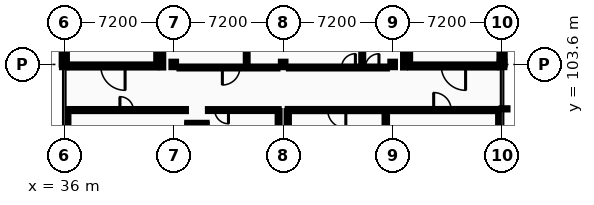
"""IFC4 building model, lengths in metres.
Left out: names, types, materials, properties, quantities, classifications, styles, units other than length and angle.
Written with IfcOpenShell. Run it as: python <this file> out.ifc"""

import sys

from ifc_helpers import new_model, si_unit, direction, frame, frame_2d, origin, origin_2d, place, context, subcontext, project, spatial, rectangle, i_section, extrude, element, fill, save


model = new_model("IFC4")
c1 = context("Model", 3, precision=1e-05, world=origin(), true_north=direction((0.0, 1.0)))
c2 = subcontext(c1, "Body", "Model", "MODEL_VIEW")
j1 = project(units=[si_unit("LENGTHUNIT", "METRE"), si_unit("PLANEANGLEUNIT", "RADIAN")], contexts=[c1])
p1 = place(None, origin())
s1 = spatial("IfcSite", under=j1, at=p1, CompositionType="ELEMENT")
p2 = place(p1, origin())
s2 = spatial("IfcBuilding", under=s1, at=p2, CompositionType="ELEMENT")
p3 = place(p2, frame((0.0, 0.0, 14.0)))
s3 = spatial("IfcBuildingStorey", under=s2, at=p3, CompositionType="ELEMENT", Elevation=14.0)
for number, where, z_axis, x_axis in (
    (1, (36.0, 103.6, 0.0), (0.0, 0.0, 1.0), (1.0, 0.0, 0.0)),
    (2, (43.2, 103.6, 0.0), (0.0, 0.0, 1.0), (1.0, 0.0, 0.0)),
    (3, (50.4, 103.6, 0.0), (0.0, 0.0, 1.0), (1.0, 0.0, 0.0)),
    (4, (57.6, 103.6, 0.0), (0.0, 0.0, 1.0), (1.0, 0.0, 0.0)),
    (5, (64.8, 103.6, 0.0), (0.0, 0.0, 1.0), (1.0, 0.0, 0.0)),
):
    element("IfcColumn", number, at=place(p3, frame(where, z_axis=z_axis, x_axis=x_axis)), inside=s3, PredefinedType="COLUMN", context=c2, shape_type="SweptSolid", body=[
        extrude(i_section(OverallWidth=0.3, OverallDepth=0.36, WebThickness=0.012, FlangeThickness=0.022, FilletRadius=0.027, at=origin_2d()), origin(), (0.0, 0.0, 1.0), 4.4),
    ])
p4 = place(p3, frame((36.0, 106.8, 0.0), z_axis=(0.0, 0.0, 1.0), x_axis=(0.0, -1.0, 0.0)))
e6 = element("IfcWall", 6, at=p4, inside=s3, PredefinedType="STANDARD", context=c2, shape_type="SweptSolid", body=[
    extrude(rectangle(XDim=3.2, YDim=0.34, at=frame_2d((1.6, 0.0))), origin(), (0.0, 0.0, 1.0), 4.2),
])
p5 = place(p4, frame((1.153, 0.0, 0.95)))
e7 = element("IfcOpeningElement", 7, at=p5, cuts=e6, PredefinedType="OPENING", context=c2, shape_type="SweptSolid", body=[
    extrude(rectangle(XDim=0.894, YDim=1.26, at=frame_2d((0.447, 0.63))), frame((0.0, 0.18, 0.0), z_axis=(0.0, -1.0, 0.0), x_axis=(1.0, 0.0, 0.0)), (0.0, 0.0, 1.0), 0.36),
])
p6 = place(p3, frame((64.8, 103.6, 0.0), z_axis=(0.0, 0.0, 1.0), x_axis=(0.0, 1.0, 0.0)))
e8 = element("IfcWall", 8, at=p6, inside=s3, PredefinedType="STANDARD", context=c2, shape_type="SweptSolid", body=[
    extrude(rectangle(XDim=3.2, YDim=0.34, at=frame_2d((1.6, 0.0))), origin(), (0.0, 0.0, 1.0), 4.2),
])
p7 = place(p6, frame((1.119, 0.0, 0.95)))
e9 = element("IfcOpeningElement", 9, at=p7, cuts=e8, PredefinedType="OPENING", context=c2, shape_type="SweptSolid", body=[
    extrude(rectangle(XDim=0.962, YDim=1.26, at=frame_2d((0.481, 0.63))), frame((0.0, 0.18, 0.0), z_axis=(0.0, -1.0, 0.0), x_axis=(1.0, 0.0, 0.0)), (0.0, 0.0, 1.0), 0.36),
])
p8 = place(p3, frame((36.35, 103.5, 0.0), z_axis=(0.0, 0.0, 1.0), x_axis=(1.0, 0.0, 0.0)))
e10 = element("IfcWall", 10, at=p8, inside=s3, PredefinedType="PARTITIONING", context=c2, shape_type="SweptSolid", body=[
    extrude(rectangle(XDim=5.7, YDim=0.2, at=frame_2d((2.85, 0.0))), origin(), (0.0, 0.0, 1.0), 3.935),
])
p9 = place(p8, frame((2.05, 0.0, 0.0)))
e11 = element("IfcOpeningElement", 11, at=p9, cuts=e10, PredefinedType="OPENING", context=c2, shape_type="SweptSolid", body=[
    extrude(rectangle(XDim=1.6, YDim=2.2, at=frame_2d((0.8, 1.1))), frame((0.0, 0.11, 0.0), z_axis=(0.0, -1.0, 0.0), x_axis=(1.0, 0.0, 0.0)), (0.0, 0.0, 1.0), 0.22),
])
p10 = place(p3, frame((42.15, 103.6, 0.0), z_axis=(0.0, 0.0, 1.0), x_axis=(0.0, 1.0, 0.0)))
e12 = element("IfcWall", 12, at=p10, inside=s3, PredefinedType="PARTITIONING", context=c2, shape_type="SweptSolid", body=[
    extrude(rectangle(XDim=3.2, YDim=0.2, at=frame_2d((1.6, 0.0))), origin(), (0.0, 0.0, 1.0), 4.2),
])
p11 = place(p3, frame((58.75, 103.5, 0.0), z_axis=(0.0, 0.0, 1.0), x_axis=(1.0, 0.0, 0.0)))
e13 = element("IfcWall", 13, at=p11, inside=s3, PredefinedType="PARTITIONING", context=c2, shape_type="SweptSolid", body=[
    extrude(rectangle(XDim=5.7, YDim=0.2, at=frame_2d((2.85, 0.0))), origin(), (0.0, 0.0, 1.0), 3.935),
])
p12 = place(p11, frame((2.05, 0.0, 0.0)))
e14 = element("IfcOpeningElement", 14, at=p12, cuts=e13, PredefinedType="OPENING", context=c2, shape_type="SweptSolid", body=[
    extrude(rectangle(XDim=1.6, YDim=2.2, at=frame_2d((0.8, 1.1))), frame((0.0, 0.11, 0.0), z_axis=(0.0, -1.0, 0.0), x_axis=(1.0, 0.0, 0.0)), (0.0, 0.0, 1.0), 0.22),
])
p13 = place(p3, frame((58.65, 103.6, 0.0), z_axis=(0.0, 0.0, 1.0), x_axis=(0.0, 1.0, 0.0)))
e15 = element("IfcWall", 15, at=p13, inside=s3, PredefinedType="PARTITIONING", context=c2, shape_type="SweptSolid", body=[
    extrude(rectangle(XDim=3.2, YDim=0.2, at=frame_2d((1.6, 0.0))), origin(), (0.0, 0.0, 1.0), 4.2),
])
p14 = place(p3, frame((44.09, 99.705, 0.0), z_axis=(0.0, 0.0, 1.0), x_axis=(1.0, 0.0, 0.0)))
e16 = element("IfcWall", 16, at=p14, inside=s3, PredefinedType="PARTITIONING", context=c2, shape_type="SweptSolid", body=[
    extrude(rectangle(XDim=1.27, YDim=0.11, at=frame_2d((0.635, 0.0))), origin(), (0.0, 0.0, 1.0), 4.2),
])
for number, where, z_axis, x_axis in (
    (17, (44.145, 98.6, 0.0), (0.0, 0.0, 1.0), (0.0, 1.0, 0.0)),
    (18, (45.305, 98.6, 0.0), (0.0, 0.0, 1.0), (0.0, 1.0, 0.0)),
):
    element("IfcWall", number, at=place(p3, frame(where, z_axis=z_axis, x_axis=x_axis)), inside=s3, PredefinedType="PARTITIONING", context=c2, shape_type="SweptSolid", body=[
        extrude(rectangle(XDim=1.05, YDim=0.11, at=frame_2d((0.525, 0.0))), origin(), (0.0, 0.0, 1.0), 4.2),
    ])
p15 = place(p3, frame((36.2, 100.6, 0.0), z_axis=(0.0, 0.0, 1.0), x_axis=(1.0, 0.0, 0.0)))
e19 = element("IfcWall", 19, at=p15, inside=s3, PredefinedType="PARTITIONING", context=c2, shape_type="SweptSolid", body=[
    extrude(rectangle(XDim=7.8, YDim=0.135, at=frame_2d((3.9, 0.0))), origin(), (0.0, 0.0, 1.0), 4.2),
])
p16 = place(p15, frame((3.46, 0.0, 0.0)))
e20 = element("IfcOpeningElement", 20, at=p16, cuts=e19, PredefinedType="OPENING", context=c2, shape_type="SweptSolid", body=[
    extrude(rectangle(XDim=0.88, YDim=2.068, at=frame_2d((0.44, 1.034))), frame((0.0, 0.078, 0.0), z_axis=(0.0, -1.0, 0.0), x_axis=(1.0, 0.0, 0.0)), (0.0, 0.0, 1.0), 0.155),
])
p17 = place(p3, frame((45.45, 100.6, 0.0), z_axis=(0.0, 0.0, 1.0), x_axis=(1.0, 0.0, 0.0)))
e21 = element("IfcWall", 21, at=p17, inside=s3, PredefinedType="PARTITIONING", context=c2, shape_type="SweptSolid", body=[
    extrude(rectangle(XDim=4.65, YDim=0.125, at=frame_2d((2.325, 0.0))), origin(), (0.0, 0.0, 1.0), 4.2),
])
p18 = place(p17, frame((0.45, 0.0, 0.0)))
e22 = element("IfcOpeningElement", 22, at=p18, cuts=e21, PredefinedType="OPENING", context=c2, shape_type="SweptSolid", body=[
    extrude(rectangle(XDim=0.9, YDim=2.1, at=frame_2d((0.45, 1.05))), frame((0.0, 0.073, 0.0), z_axis=(0.0, -1.0, 0.0), x_axis=(1.0, 0.0, 0.0)), (0.0, 0.0, 1.0), 0.145),
])
p19 = place(p3, frame((50.7, 100.6, 0.0), z_axis=(0.0, 0.0, 1.0), x_axis=(1.0, 0.0, 0.0)))
e23 = element("IfcWall", 23, at=p19, inside=s3, PredefinedType="PARTITIONING", context=c2, shape_type="SweptSolid", body=[
    extrude(rectangle(XDim=13.9, YDim=0.142, at=frame_2d((6.95, 0.0))), origin(), (0.0, 0.0, 1.0), 4.2),
])
p20 = place(p19, frame((2.629, 0.0, 0.0)))
e24 = element("IfcOpeningElement", 24, at=p20, cuts=e23, PredefinedType="OPENING", context=c2, shape_type="SweptSolid", body=[
    extrude(rectangle(XDim=1.192, YDim=2.04, at=frame_2d((0.596, 1.02))), frame((0.0, 0.081, 0.0), z_axis=(0.0, -1.0, 0.0), x_axis=(1.0, 0.0, 0.0)), (0.0, 0.0, 1.0), 0.162),
])
p21 = place(p19, frame((9.6, 0.0, 0.0)))
e25 = element("IfcOpeningElement", 25, at=p21, cuts=e23, PredefinedType="OPENING", context=c2, shape_type="SweptSolid", body=[
    extrude(rectangle(XDim=1.15, YDim=2.15, at=frame_2d((0.575, 1.075))), frame((0.0, 0.081, 0.0), z_axis=(0.0, -1.0, 0.0), x_axis=(1.0, 0.0, 0.0)), (0.0, 0.0, 1.0), 0.162),
])
p22 = place(p3, frame((43.58, 103.4, 0.0), z_axis=(0.0, 0.0, 1.0), x_axis=(1.0, 0.0, 0.0)))
e26 = element("IfcWall", 26, at=p22, inside=s3, PredefinedType="PARTITIONING", context=c2, shape_type="SweptSolid", body=[
    extrude(rectangle(XDim=6.44, YDim=0.125, at=frame_2d((3.22, 0.0))), origin(), (0.0, 0.0, 1.0), 3.935),
])
p23 = place(p22, frame((2.82, 0.0, 0.0)))
e27 = element("IfcOpeningElement", 27, at=p23, cuts=e26, PredefinedType="OPENING", context=c2, shape_type="SweptSolid", body=[
    extrude(rectangle(XDim=1.15, YDim=2.15, at=frame_2d((0.575, 1.075))), frame((0.0, 0.073, 0.0), z_axis=(0.0, -1.0, 0.0), x_axis=(1.0, 0.0, 0.0)), (0.0, 0.0, 1.0), 0.145),
])
p24 = place(p3, frame((50.78, 103.4, 0.0), z_axis=(0.0, 0.0, 1.0), x_axis=(1.0, 0.0, 0.0)))
e28 = element("IfcWall", 28, at=p24, inside=s3, PredefinedType="PARTITIONING", context=c2, shape_type="SweptSolid", body=[
    extrude(rectangle(XDim=6.44, YDim=0.125, at=frame_2d((3.22, 0.0))), origin(), (0.0, 0.0, 1.0), 3.935),
])
p25 = place(p24, frame((5.02, 0.0, 0.0)))
e29 = element("IfcOpeningElement", 29, at=p25, cuts=e28, PredefinedType="OPENING", context=c2, shape_type="SweptSolid", body=[
    extrude(rectangle(XDim=0.9, YDim=2.1, at=frame_2d((0.45, 1.05))), frame((0.0, 0.073, 0.0), z_axis=(0.0, -1.0, 0.0), x_axis=(1.0, 0.0, 0.0)), (0.0, 0.0, 1.0), 0.145),
])
p26 = place(p24, frame((3.464, 0.0, 0.0)))
e30 = element("IfcOpeningElement", 30, at=p26, cuts=e28, PredefinedType="OPENING", context=c2, shape_type="SweptSolid", body=[
    extrude(rectangle(XDim=0.906, YDim=2.068, at=frame_2d((0.453, 1.034))), frame((0.0, 0.073, 0.0), z_axis=(0.0, -1.0, 0.0), x_axis=(1.0, 0.0, 0.0)), (0.0, 0.0, 1.0), 0.145),
])
p27 = place(p3, frame((36.2, 96.78, 0.0), z_axis=(0.0, 0.0, 1.0), x_axis=(0.0, 1.0, 0.0)))
e31 = element("IfcWall", 31, at=p27, inside=s3, PredefinedType="PARTITIONING", context=c2, shape_type="SweptSolid", body=[
    extrude(rectangle(XDim=3.752, YDim=0.142, at=frame_2d((1.876, 0.0))), origin(), (0.0, 0.0, 1.0), 3.885),
])
p28 = place(p3, frame((42.45, 103.4, 0.0), z_axis=(0.0, 0.0, 1.0), x_axis=(0.0, 1.0, 0.0)))
e32 = element("IfcWall", 32, at=p28, inside=s3, PredefinedType="PARTITIONING", context=c2, shape_type="SweptSolid", body=[
    extrude(rectangle(XDim=3.225, YDim=0.118, at=frame_2d((1.613, 0.0))), origin(), (0.0, 0.0, 1.0), 4.2),
])
p29 = place(p3, frame((48.0, 103.462, 0.0), z_axis=(0.0, 0.0, 1.0), x_axis=(0.0, 1.0, 0.0)))
e33 = element("IfcWall", 33, at=p29, inside=s3, PredefinedType="PARTITIONING", context=c2, shape_type="SweptSolid", body=[
    extrude(rectangle(XDim=14.338, YDim=0.118, at=frame_2d((7.169, 0.0))), origin(), (0.0, 0.0, 1.0), 3.945),
])
p30 = place(p3, frame((50.1, 96.78, 0.0), z_axis=(0.0, 0.0, 1.0), x_axis=(0.0, 1.0, 0.0)))
e34 = element("IfcWall", 34, at=p30, inside=s3, PredefinedType="PARTITIONING", context=c2, shape_type="SweptSolid", body=[
    extrude(rectangle(XDim=3.758, YDim=0.125, at=frame_2d((1.879, 0.0))), origin(), (0.0, 0.0, 1.0), 4.2),
])
p31 = place(p3, frame((50.7, 96.78, 0.0), z_axis=(0.0, 0.0, 1.0), x_axis=(0.0, 1.0, 0.0)))
e35 = element("IfcWall", 35, at=p31, inside=s3, PredefinedType="PARTITIONING", context=c2, shape_type="SweptSolid", body=[
    extrude(rectangle(XDim=3.749, YDim=0.15, at=frame_2d((1.875, 0.0))), origin(), (0.0, 0.0, 1.0), 3.895),
])
p32 = place(p3, frame((55.6, 103.462, 0.0), z_axis=(0.0, 0.0, 1.0), x_axis=(0.0, 1.0, 0.0)))
e36 = element("IfcWall", 36, at=p32, inside=s3, PredefinedType="PARTITIONING", context=c2, shape_type="SweptSolid", body=[
    extrude(rectangle(XDim=14.338, YDim=0.125, at=frame_2d((7.169, 0.0))), origin(), (0.0, 0.0, 1.0), 4.2),
])
p33 = place(p3, frame((57.15, 89.471, 0.0), z_axis=(0.0, 0.0, 1.0), x_axis=(0.0, 1.0, 0.0)))
e37 = element("IfcWall", 37, at=p33, inside=s3, PredefinedType="PARTITIONING", context=c2, shape_type="SweptSolid", body=[
    extrude(rectangle(XDim=11.058, YDim=0.16, at=frame_2d((5.529, 0.0))), origin(), (0.0, 0.0, 1.0), 4.2),
])
p34 = place(p3, frame((58.35, 103.4, 0.0), z_axis=(0.0, 0.0, 1.0), x_axis=(0.0, 1.0, 0.0)))
e38 = element("IfcWall", 38, at=p34, inside=s3, PredefinedType="PARTITIONING", context=c2, shape_type="SweptSolid", body=[
    extrude(rectangle(XDim=3.225, YDim=0.125, at=frame_2d((1.613, 0.0))), origin(), (0.0, 0.0, 1.0), 4.2),
])
p35 = place(p3, frame((64.6, 96.78, 0.0), z_axis=(0.0, 0.0, 1.0), x_axis=(0.0, 1.0, 0.0)))
e39 = element("IfcWall", 39, at=p35, inside=s3, PredefinedType="PARTITIONING", context=c2, shape_type="SweptSolid", body=[
    extrude(rectangle(XDim=3.749, YDim=0.118, at=frame_2d((1.875, 0.0))), origin(), (0.0, 0.0, 1.0), 3.885),
])
p36 = place(p9, origin())
e40 = element("IfcDoor", 40, at=p36, inside=s3, OperationType="DOUBLE_DOOR_SINGLE_SWING", PredefinedType="DOOR", context=c2, shape_type="SweptSolid", body=[
    extrude(rectangle(XDim=1.6, YDim=2.2, at=frame_2d((0.8, 1.1))), frame((0.0, 0.025, 0.0), z_axis=(0.0, -1.0, 0.0), x_axis=(1.0, 0.0, 0.0)), (0.0, 0.0, 1.0), 0.05),
])
fill(e11, e40)
p37 = place(p12, origin())
e41 = element("IfcDoor", 41, at=p37, inside=s3, OperationType="DOUBLE_DOOR_SINGLE_SWING", PredefinedType="DOOR", context=c2, shape_type="SweptSolid", body=[
    extrude(rectangle(XDim=1.6, YDim=2.2, at=frame_2d((0.8, 1.1))), frame((0.0, 0.025, 0.0), z_axis=(0.0, -1.0, 0.0), x_axis=(1.0, 0.0, 0.0)), (0.0, 0.0, 1.0), 0.05),
])
fill(e14, e41)
p38 = place(p25, frame((0.9, 0.0, 0.0), z_axis=(0.0, 0.0, 1.0), x_axis=(-1.0, 0.0, 0.0)))
e42 = element("IfcDoor", 42, at=p38, inside=s3, OperationType="SINGLE_SWING_RIGHT", PredefinedType="DOOR", context=c2, shape_type="SweptSolid", body=[
    extrude(rectangle(XDim=0.9, YDim=2.1, at=frame_2d((0.45, 1.05))), frame((0.0, 0.025, 0.0), z_axis=(0.0, -1.0, 0.0), x_axis=(1.0, 0.0, 0.0)), (0.0, 0.0, 1.0), 0.05),
])
fill(e29, e42)
p39 = place(p18, origin())
e43 = element("IfcDoor", 43, at=p39, inside=s3, OperationType="SINGLE_SWING_RIGHT", PredefinedType="DOOR", context=c2, shape_type="SweptSolid", body=[
    extrude(rectangle(XDim=0.9, YDim=2.1, at=frame_2d((0.45, 1.05))), frame((0.0, 0.025, 0.0), z_axis=(0.0, -1.0, 0.0), x_axis=(1.0, 0.0, 0.0)), (0.0, 0.0, 1.0), 0.05),
])
fill(e22, e43)
p40 = place(p20, origin())
e44 = element("IfcDoor", 44, at=p40, inside=s3, OperationType="SINGLE_SWING_RIGHT", PredefinedType="DOOR", context=c2, shape_type="SweptSolid", body=[
    extrude(rectangle(XDim=1.192, YDim=2.04, at=frame_2d((0.596, 1.02))), frame((0.0, 0.025, 0.0), z_axis=(0.0, -1.0, 0.0), x_axis=(1.0, 0.0, 0.0)), (0.0, 0.0, 1.0), 0.05),
])
fill(e24, e44)
p41 = place(p23, frame((1.15, 0.0, 0.0), z_axis=(0.0, 0.0, 1.0), x_axis=(-1.0, 0.0, 0.0)))
e45 = element("IfcDoor", 45, at=p41, inside=s3, OperationType="SINGLE_SWING_LEFT", PredefinedType="DOOR", context=c2, shape_type="SweptSolid", body=[
    extrude(rectangle(XDim=1.15, YDim=2.15, at=frame_2d((0.575, 1.075))), frame((0.0, 0.025, 0.0), z_axis=(0.0, -1.0, 0.0), x_axis=(1.0, 0.0, 0.0)), (0.0, 0.0, 1.0), 0.05),
])
fill(e27, e45)
p42 = place(p21, origin())
e46 = element("IfcDoor", 46, at=p42, inside=s3, OperationType="SINGLE_SWING_LEFT", PredefinedType="DOOR", context=c2, shape_type="SweptSolid", body=[
    extrude(rectangle(XDim=1.15, YDim=2.15, at=frame_2d((0.575, 1.075))), frame((0.0, 0.025, 0.0), z_axis=(0.0, -1.0, 0.0), x_axis=(1.0, 0.0, 0.0)), (0.0, 0.0, 1.0), 0.05),
])
fill(e25, e46)
p43 = place(p16, origin())
e47 = element("IfcDoor", 47, at=p43, inside=s3, OperationType="SINGLE_SWING_LEFT", PredefinedType="DOOR", context=c2, shape_type="SweptSolid", body=[
    extrude(rectangle(XDim=0.88, YDim=2.068, at=frame_2d((0.44, 1.034))), frame((0.0, 0.025, 0.0), z_axis=(0.0, -1.0, 0.0), x_axis=(1.0, 0.0, 0.0)), (0.0, 0.0, 1.0), 0.05),
])
fill(e20, e47)
p44 = place(p26, frame((0.906, 0.0, 0.0), z_axis=(0.0, 0.0, 1.0), x_axis=(-1.0, 0.0, 0.0)))
e48 = element("IfcDoor", 48, at=p44, inside=s3, OperationType="SINGLE_SWING_RIGHT", PredefinedType="DOOR", context=c2, shape_type="SweptSolid", body=[
    extrude(rectangle(XDim=0.906, YDim=2.068, at=frame_2d((0.453, 1.034))), frame((0.0, 0.025, 0.0), z_axis=(0.0, -1.0, 0.0), x_axis=(1.0, 0.0, 0.0)), (0.0, 0.0, 1.0), 0.05),
])
fill(e30, e48)
save(model, sys.argv[1])
